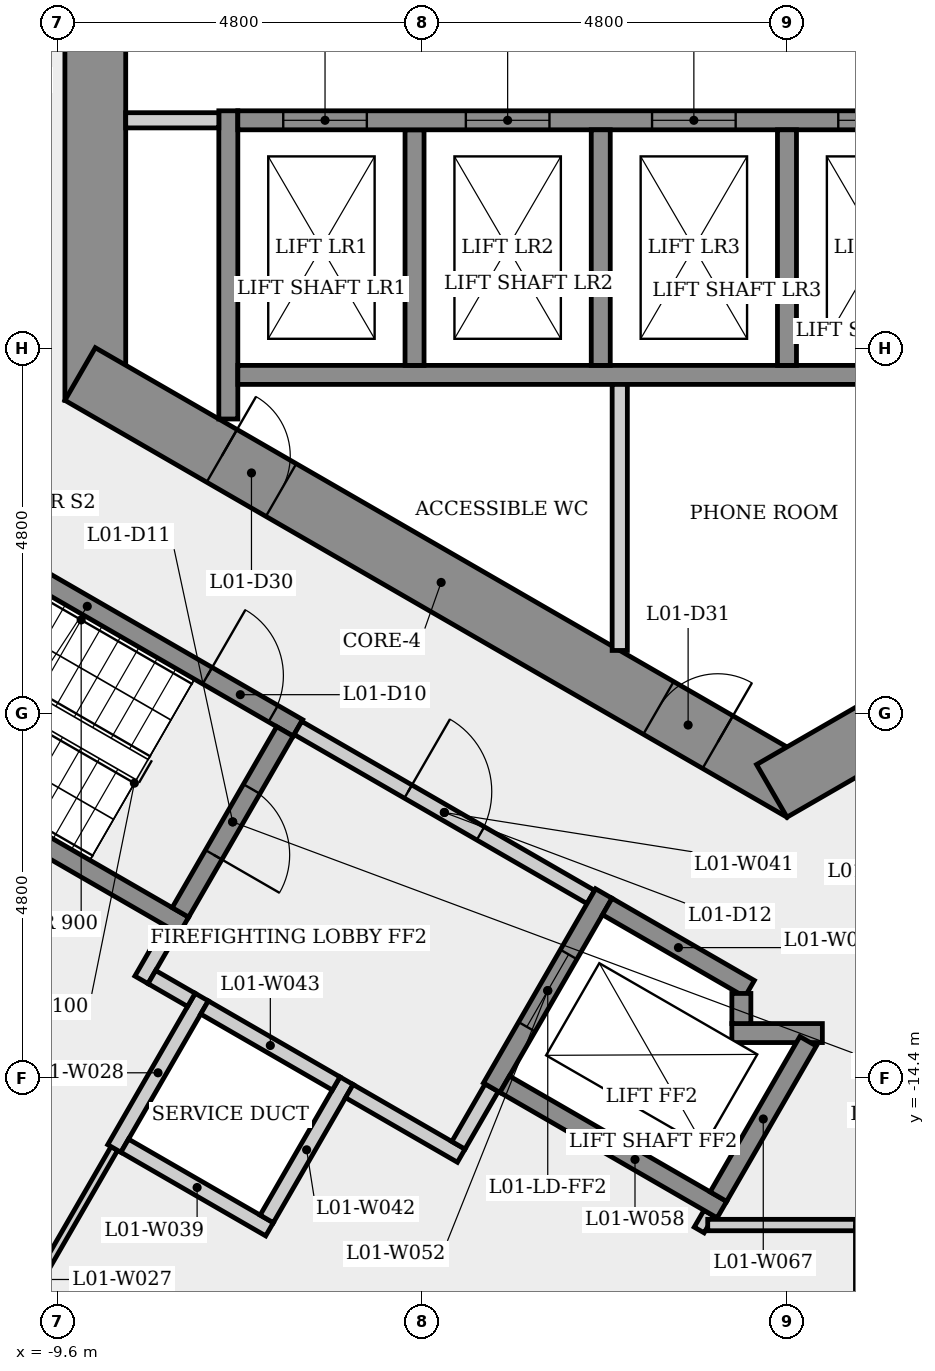
"""IFC4 building model, lengths in metres.
Left out: names, types, materials, properties, quantities, classifications, styles, units other than length and angle.
Written with IfcOpenShell. Run it as: python <this file> out.ifc"""

import sys

from ifc_helpers import new_model, si_unit, direction, frame, frame_2d, origin, place, context, subcontext, project, spatial, rectangle, extrude, element, fill, save


model = new_model("IFC4")
c1 = context("Model", 3, precision=1e-05, world=origin(), true_north=direction((0.0, 1.0)))
c2 = subcontext(c1, "Body", "Model", "MODEL_VIEW")
j1 = project(units=[si_unit("LENGTHUNIT", "METRE"), si_unit("PLANEANGLEUNIT", "RADIAN")], contexts=[c1])
p1 = place(None, origin())
s1 = spatial("IfcSite", under=j1, at=p1, CompositionType="ELEMENT")
p2 = place(p1, origin())
s2 = spatial("IfcBuilding", under=s1, at=p2, CompositionType="ELEMENT")
p3 = place(p2, frame((0.0, 0.0, 7.0)))
s3 = spatial("IfcBuildingStorey", under=s2, at=p3, CompositionType="ELEMENT", Elevation=7.0)
p4 = place(p3, frame((-9.1, 5.485, 0.0), z_axis=(0.0, 0.0, 1.0), x_axis=(0.0, -1.0, 0.0)))
e1 = element("IfcWall", 1, at=p4, inside=s3, PredefinedType="SHEAR", context=c2, shape_type="SweptSolid", body=[
    extrude(rectangle(XDim=10.97, YDim=0.8, at=frame_2d((5.485, 0.0))), origin(), (0.0, 0.0, 1.0), 4.5),
])
p5 = place(p4, frame((4.685, 0.0, 0.0)))
e2 = element("IfcOpeningElement", 2, at=p5, cuts=e1, PredefinedType="OPENING", context=c2, shape_type="SweptSolid", body=[
    extrude(rectangle(XDim=1.6, YDim=2.1, at=frame_2d((0.8, 1.05))), frame((0.0, 0.41, 0.0), z_axis=(0.0, -1.0, 0.0), x_axis=(1.0, 0.0, 0.0)), (0.0, 0.0, 1.0), 0.82),
])
p6 = place(p3, frame((-9.3, -5.138, 0.0), z_axis=(0.0, 0.0, 1.0), x_axis=(0.866023993627, -0.500002442456, 0.0)))
e3 = element("IfcWall", 3, at=p6, inside=s3, PredefinedType="SHEAR", context=c2, shape_type="SweptSolid", body=[
    extrude(rectangle(XDim=10.97, YDim=0.8, at=frame_2d((5.485, 0.0))), origin(), (0.0, 0.0, 1.0), 4.5),
])
p7 = place(p6, frame((2.153, 0.0, 0.0)))
e4 = element("IfcOpeningElement", 4, at=p7, cuts=e3, PredefinedType="OPENING", context=c2, shape_type="SweptSolid", body=[
    extrude(rectangle(XDim=0.9, YDim=2.1, at=frame_2d((0.45, 1.05))), frame((0.0, 0.41, 0.0), z_axis=(0.0, -1.0, 0.0), x_axis=(1.0, 0.0, 0.0)), (0.0, 0.0, 1.0), 0.82),
])
p8 = place(p6, frame((8.787, 0.0, 0.0)))
e5 = element("IfcOpeningElement", 5, at=p8, cuts=e3, PredefinedType="OPENING", context=c2, shape_type="SweptSolid", body=[
    extrude(rectangle(XDim=0.9, YDim=2.1, at=frame_2d((0.45, 1.05))), frame((0.0, 0.41, 0.0), z_axis=(0.0, -1.0, 0.0), x_axis=(1.0, 0.0, 0.0)), (0.0, 0.0, 1.0), 0.82),
])
p9 = place(p3, frame((-0.2, -10.623, 0.0), z_axis=(0.0, 0.0, 1.0), x_axis=(0.866023993627, 0.500002442456, 0.0)))
e6 = element("IfcWall", 6, at=p9, inside=s3, PredefinedType="SHEAR", context=c2, shape_type="SweptSolid", body=[
    extrude(rectangle(XDim=10.97, YDim=0.8, at=frame_2d((5.485, 0.0))), origin(), (0.0, 0.0, 1.0), 4.5),
])
p10 = place(p9, frame((7.57, 0.0, 0.0)))
e7 = element("IfcOpeningElement", 7, at=p10, cuts=e6, PredefinedType="OPENING", context=c2, shape_type="SweptSolid", body=[
    extrude(rectangle(XDim=0.9, YDim=2.1, at=frame_2d((0.45, 1.05))), frame((0.0, 0.41, 0.0), z_axis=(0.0, -1.0, 0.0), x_axis=(1.0, 0.0, 0.0)), (0.0, 0.0, 1.0), 0.82),
])
p11 = place(p3, frame((-11.977, -6.595, 0.0), z_axis=(0.0, 0.0, 1.0), x_axis=(0.866025499775, -0.499999833739, 0.0)))
e8 = element("IfcWall", 8, at=p11, inside=s3, PredefinedType="SHEAR", context=c2, shape_type="SweptSolid", body=[
    extrude(rectangle(XDim=6.4, YDim=0.25, at=frame_2d((3.2, 0.0))), origin(), (0.0, 0.0, 1.0), 4.1),
])
p12 = place(p11, frame((5.025, 0.0, 0.0)))
e9 = element("IfcOpeningElement", 9, at=p12, cuts=e8, PredefinedType="OPENING", context=c2, shape_type="SweptSolid", body=[
    extrude(rectangle(XDim=1.0, YDim=2.1, at=frame_2d((0.5, 1.05))), frame((0.0, 0.135, 0.0), z_axis=(0.0, -1.0, 0.0), x_axis=(1.0, 0.0, 0.0)), (0.0, 0.0, 1.0), 0.27),
])
p13 = place(p3, frame((-10.84, -18.776, 0.0), z_axis=(0.0, 0.0, 1.0), x_axis=(0.499991453095, 0.866030338286, 0.0)))
e10 = element("IfcWall", 10, at=p13, inside=s3, PredefinedType="PARTITIONING", context=c2, shape_type="SweptSolid", body=[
    extrude(rectangle(XDim=3.98, YDim=0.1, at=frame_2d((1.99, 0.0))), origin(), (0.0, 0.0, 1.0), 4.1),
])
p14 = place(p3, frame((-8.85, -15.329, 0.0), z_axis=(0.0, 0.0, 1.0), x_axis=(0.500077740698, 0.865980515519, 0.0)))
e11 = element("IfcWall", 11, at=p14, inside=s3, PredefinedType="PLUMBINGWALL", context=c2, shape_type="SweptSolid", body=[
    extrude(rectangle(XDim=2.3, YDim=0.2, at=frame_2d((1.15, 0.0))), origin(), (0.0, 0.0, 1.0), 4.1),
])
p15 = place(p3, frame((-8.493, -13.11, 0.0), z_axis=(0.0, 0.0, 1.0), x_axis=(0.500067724834, 0.865986299303, 0.0)))
e12 = element("IfcWall", 12, at=p15, inside=s3, PredefinedType="PARTITIONING", context=c2, shape_type="SweptSolid", body=[
    extrude(rectangle(XDim=0.775, YDim=0.2, at=frame_2d((0.388, 0.0))), origin(), (0.0, 0.0, 1.0), 4.1),
])
p16 = place(p3, frame((-7.935, -12.393, 0.0), z_axis=(0.0, 0.0, 1.0), x_axis=(-0.866025499775, 0.499999833739, 0.0)))
e13 = element("IfcWall", 13, at=p16, inside=s3, PredefinedType="SHEAR", context=c2, shape_type="SweptSolid", body=[
    extrude(rectangle(XDim=6.4, YDim=0.25, at=frame_2d((3.2, 0.0))), origin(), (0.0, 0.0, 1.0), 4.1),
])
p17 = place(p3, frame((-7.836, -13.373, 0.0), z_axis=(0.0, 0.0, 1.0), x_axis=(-0.866232998003, 0.499640263761, 0.0)))
e14 = element("IfcWall", 14, at=p17, inside=s3, PredefinedType="PARTITIONING", context=c2, shape_type="SweptSolid", body=[
    extrude(rectangle(XDim=0.6, YDim=0.2, at=frame_2d((0.3, 0.0))), origin(), (0.0, 0.0, 1.0), 4.1),
])
p18 = place(p3, frame((-7.35, -5.73, 0.0), z_axis=(0.0, 0.0, 1.0), x_axis=(0.0, 1.0, 0.0)))
e15 = element("IfcWall", 15, at=p18, inside=s3, PredefinedType="SHEAR", context=c2, shape_type="SweptSolid", body=[
    extrude(rectangle(XDim=4.055, YDim=0.25, at=frame_2d((2.028, 0.0))), origin(), (0.0, 0.0, 1.0), 4.1),
])
p19 = place(p3, frame((-7.475, -1.8, 0.0), z_axis=(0.0, 0.0, 1.0), x_axis=(-1.0, 0.0, 0.0)))
e16 = element("IfcWall", 16, at=p19, inside=s3, PredefinedType="PARTITIONING", context=c2, shape_type="SweptSolid", body=[
    extrude(rectangle(XDim=1.225, YDim=0.2, at=frame_2d((0.613, 0.0))), origin(), (0.0, 0.0, 1.0), 4.1),
])
p20 = place(p3, frame((-6.808, -16.392, 0.0), z_axis=(0.0, 0.0, 1.0), x_axis=(-0.866008176907, 0.50002983664, 0.0)))
e17 = element("IfcWall", 17, at=p20, inside=s3, PredefinedType="PLUMBINGWALL", context=c2, shape_type="SweptSolid", body=[
    extrude(rectangle(XDim=2.2, YDim=0.2, at=frame_2d((1.1, 0.0))), origin(), (0.0, 0.0, 1.0), 4.1),
])
p21 = place(p3, frame((-6.605, -9.841, 0.0), z_axis=(0.0, 0.0, 1.0), x_axis=(-0.499996545922, -0.866027397988, 0.0)))
e18 = element("IfcWall", 18, at=p21, inside=s3, PredefinedType="SHEAR", context=c2, shape_type="SweptSolid", body=[
    extrude(rectangle(XDim=2.75, YDim=0.25, at=frame_2d((1.375, 0.0))), origin(), (0.0, 0.0, 1.0), 4.1),
])
p22 = place(p21, frame((0.875, 0.0, 0.0)))
e19 = element("IfcOpeningElement", 19, at=p22, cuts=e18, PredefinedType="OPENING", context=c2, shape_type="SweptSolid", body=[
    extrude(rectangle(XDim=1.0, YDim=2.1, at=frame_2d((0.5, 1.05))), frame((0.0, 0.135, 0.0), z_axis=(0.0, -1.0, 0.0), x_axis=(1.0, 0.0, 0.0)), (0.0, 0.0, 1.0), 0.27),
])
p23 = place(p3, frame((-6.435, -9.795, 0.0), z_axis=(0.0, 0.0, 1.0), x_axis=(0.866012907634, -0.500021643343, 0.0)))
e20 = element("IfcWall", 20, at=p23, inside=s3, PredefinedType="PARTITIONING", context=c2, shape_type="SweptSolid", body=[
    extrude(rectangle(XDim=4.45, YDim=0.2, at=frame_2d((2.225, 0.0))), origin(), (0.0, 0.0, 1.0), 4.1),
])
p24 = place(p23, frame((1.675, 0.0, 0.0)))
e21 = element("IfcOpeningElement", 21, at=p24, cuts=e20, PredefinedType="OPENING", context=c2, shape_type="SweptSolid", body=[
    extrude(rectangle(XDim=1.1, YDim=2.1, at=frame_2d((0.55, 1.05))), frame((0.0, 0.11, 0.0), z_axis=(0.0, -1.0, 0.0), x_axis=(1.0, 0.0, 0.0)), (0.0, 0.0, 1.0), 0.22),
])
p25 = place(p3, frame((-5.795, -14.437, 0.0), z_axis=(0.0, 0.0, 1.0), x_axis=(-0.500027713859, -0.866009402589, 0.0)))
e22 = element("IfcWall", 22, at=p25, inside=s3, PredefinedType="PLUMBINGWALL", context=c2, shape_type="SweptSolid", body=[
    extrude(rectangle(XDim=2.1, YDim=0.2, at=frame_2d((1.05, 0.0))), origin(), (0.0, 0.0, 1.0), 4.1),
])
p26 = place(p3, frame((-5.931, -14.473, 0.0), z_axis=(0.0, 0.0, 1.0), x_axis=(-0.866041268327, 0.499972520799, 0.0)))
e23 = element("IfcWall", 23, at=p26, inside=s3, PredefinedType="PLUMBINGWALL", context=c2, shape_type="SweptSolid", body=[
    extrude(rectangle(XDim=2.0, YDim=0.2, at=frame_2d((1.0, 0.0))), origin(), (0.0, 0.0, 1.0), 4.1),
])
p27 = place(p3, frame((-7.225, -5.15, 0.0), z_axis=(0.0, 0.0, 1.0), x_axis=(1.0, 0.0, 0.0)))
e24 = element("IfcWall", 24, at=p27, inside=s3, PredefinedType="SHEAR", context=c2, shape_type="SweptSolid", body=[
    extrude(rectangle(XDim=14.7, YDim=0.25, at=frame_2d((7.35, 0.0))), origin(), (0.0, 0.0, 1.0), 4.1),
])
p28 = place(p3, frame((-4.9, -1.925, 0.0), z_axis=(0.0, 0.0, 1.0), x_axis=(0.0, -1.0, 0.0)))
e25 = element("IfcWall", 25, at=p28, inside=s3, PredefinedType="SHEAR", context=c2, shape_type="SweptSolid", body=[
    extrude(rectangle(XDim=3.1, YDim=0.25, at=frame_2d((1.55, 0.0))), origin(), (0.0, 0.0, 1.0), 4.5),
])
p29 = place(p3, frame((-7.225, -1.8, 0.0), z_axis=(0.0, 0.0, 1.0), x_axis=(1.0, 0.0, 0.0)))
e26 = element("IfcWall", 26, at=p29, inside=s3, PredefinedType="SHEAR", context=c2, shape_type="SweptSolid", body=[
    extrude(rectangle(XDim=14.7, YDim=0.25, at=frame_2d((7.35, 0.0))), origin(), (0.0, 0.0, 1.0), 4.1),
])
p30 = place(p29, frame((0.597, 0.0, 0.0)))
e27 = element("IfcOpeningElement", 27, at=p30, cuts=e26, PredefinedType="OPENING", context=c2, shape_type="SweptSolid", body=[
    extrude(rectangle(XDim=1.1, YDim=2.1, at=frame_2d((0.55, 1.05))), frame((0.0, 0.135, 0.0), z_axis=(0.0, -1.0, 0.0), x_axis=(1.0, 0.0, 0.0)), (0.0, 0.0, 1.0), 0.27),
])
p31 = place(p29, frame((3.0, 0.0, 0.0)))
e28 = element("IfcOpeningElement", 28, at=p31, cuts=e26, PredefinedType="OPENING", context=c2, shape_type="SweptSolid", body=[
    extrude(rectangle(XDim=1.1, YDim=2.1, at=frame_2d((0.55, 1.05))), frame((0.0, 0.135, 0.0), z_axis=(0.0, -1.0, 0.0), x_axis=(1.0, 0.0, 0.0)), (0.0, 0.0, 1.0), 0.27),
])
p32 = place(p29, frame((5.45, 0.0, 0.0)))
e29 = element("IfcOpeningElement", 29, at=p32, cuts=e26, PredefinedType="OPENING", context=c2, shape_type="SweptSolid", body=[
    extrude(rectangle(XDim=1.1, YDim=2.1, at=frame_2d((0.55, 1.05))), frame((0.0, 0.135, 0.0), z_axis=(0.0, -1.0, 0.0), x_axis=(1.0, 0.0, 0.0)), (0.0, 0.0, 1.0), 0.27),
])
p33 = place(p29, frame((7.9, 0.0, 0.0)))
e30 = element("IfcOpeningElement", 30, at=p33, cuts=e26, PredefinedType="OPENING", context=c2, shape_type="SweptSolid", body=[
    extrude(rectangle(XDim=1.1, YDim=2.1, at=frame_2d((0.55, 1.05))), frame((0.0, 0.135, 0.0), z_axis=(0.0, -1.0, 0.0), x_axis=(1.0, 0.0, 0.0)), (0.0, 0.0, 1.0), 0.27),
])
p34 = place(p29, frame((10.35, 0.0, 0.0)))
e31 = element("IfcOpeningElement", 31, at=p34, cuts=e26, PredefinedType="OPENING", context=c2, shape_type="SweptSolid", body=[
    extrude(rectangle(XDim=1.1, YDim=2.1, at=frame_2d((0.55, 1.05))), frame((0.0, 0.135, 0.0), z_axis=(0.0, -1.0, 0.0), x_axis=(1.0, 0.0, 0.0)), (0.0, 0.0, 1.0), 0.27),
])
p35 = place(p3, frame((-4.286, -15.423, 0.0), z_axis=(0.0, 0.0, 1.0), x_axis=(-0.866025371046, 0.500000056704, 0.0)))
e32 = element("IfcWall", 32, at=p35, inside=s3, PredefinedType="PARTITIONING", context=c2, shape_type="SweptSolid", body=[
    extrude(rectangle(XDim=1.7, YDim=0.2, at=frame_2d((0.85, 0.0))), origin(), (0.0, 0.0, 1.0), 4.1),
])
p36 = place(p3, frame((-3.885, -14.529, 0.0), z_axis=(0.0, 0.0, 1.0), x_axis=(-0.499859285417, -0.866106630146, 0.0)))
e33 = element("IfcWall", 33, at=p36, inside=s3, PredefinedType="PARTITIONING", context=c2, shape_type="SweptSolid", body=[
    extrude(rectangle(XDim=0.875, YDim=0.2, at=frame_2d((0.438, 0.0))), origin(), (0.0, 0.0, 1.0), 4.1),
])
p37 = place(p3, frame((-2.41, -11.974, 0.0), z_axis=(0.0, 0.0, 1.0), x_axis=(-0.500001826776, -0.866024349092, 0.0)))
e34 = element("IfcWall", 34, at=p37, inside=s3, PredefinedType="SHEAR", context=c2, shape_type="SweptSolid", body=[
    extrude(rectangle(XDim=2.95, YDim=0.25, at=frame_2d((1.475, 0.0))), origin(), (0.0, 0.0, 1.0), 4.1),
])
p38 = place(p37, frame((0.925, 0.0, 0.0)))
e35 = element("IfcOpeningElement", 35, at=p38, cuts=e34, PredefinedType="OPENING", context=c2, shape_type="SweptSolid", body=[
    extrude(rectangle(XDim=1.1, YDim=2.1, at=frame_2d((0.55, 1.05))), frame((0.0, 0.135, 0.0), z_axis=(0.0, -1.0, 0.0), x_axis=(1.0, 0.0, 0.0)), (0.0, 0.0, 1.0), 0.27),
])
p39 = place(p3, frame((-2.364, -12.145, 0.0), z_axis=(0.0, 0.0, 1.0), x_axis=(0.86603892542, -0.499976579108, 0.0)))
e36 = element("IfcWall", 36, at=p39, inside=s3, PredefinedType="SHEAR", context=c2, shape_type="SweptSolid", body=[
    extrude(rectangle(XDim=2.162, YDim=0.25, at=frame_2d((1.081, 0.0))), origin(), (0.0, 0.0, 1.0), 4.1),
])
p40 = place(p3, frame((-2.45, -1.925, 0.0), z_axis=(0.0, 0.0, 1.0), x_axis=(0.0, -1.0, 0.0)))
e37 = element("IfcWall", 37, at=p40, inside=s3, PredefinedType="SHEAR", context=c2, shape_type="SweptSolid", body=[
    extrude(rectangle(XDim=3.1, YDim=0.25, at=frame_2d((1.55, 0.0))), origin(), (0.0, 0.0, 1.0), 4.5),
])
p41 = place(p3, frame((-2.2, -5.275, 0.0), z_axis=(0.0, 0.0, 1.0), x_axis=(0.0, -1.0, 0.0)))
e38 = element("IfcWall", 38, at=p41, inside=s3, PredefinedType="PARTITIONING", context=c2, shape_type="SweptSolid", body=[
    extrude(rectangle(XDim=3.501, YDim=0.2, at=frame_2d((1.75, 0.0))), origin(), (0.0, 0.0, 1.0), 4.1),
])
p42 = place(p3, frame((-1.155, -16.401, 0.0), z_axis=(0.0, 0.0, 1.0), x_axis=(0.500134748329, 0.865947592822, 0.0)))
e39 = element("IfcWall", 39, at=p42, inside=s3, PredefinedType="PARTITIONING", context=c2, shape_type="SweptSolid", body=[
    extrude(rectangle(XDim=0.256, YDim=0.15, at=frame_2d((0.128, 0.0))), origin(), (0.0, 0.0, 1.0), 4.1),
])
p43 = place(p3, frame((-0.856, -16.133, 0.0), z_axis=(0.0, 0.0, 1.0), x_axis=(-0.866021716278, 0.500006386895, 0.0)))
e40 = element("IfcWall", 40, at=p43, inside=s3, PredefinedType="SHEAR", context=c2, shape_type="SweptSolid", body=[
    extrude(rectangle(XDim=3.3, YDim=0.25, at=frame_2d((1.65, 0.0))), origin(), (0.0, 0.0, 1.0), 4.1),
])
p44 = place(p3, frame((-0.725, -13.81, 0.0), z_axis=(0.0, 0.0, 1.0), x_axis=(1.0, 0.0, 0.0)))
e41 = element("IfcWall", 41, at=p44, inside=s3, PredefinedType="SHEAR", context=c2, shape_type="SweptSolid", body=[
    extrude(rectangle(XDim=1.191, YDim=0.25, at=frame_2d((0.595, 0.0))), origin(), (0.0, 0.0, 1.0), 4.1),
])
p45 = place(p3, frame((-0.6, -13.289, 0.0), z_axis=(0.0, 0.0, 1.0), x_axis=(0.0, -1.0, 0.0)))
e42 = element("IfcWall", 42, at=p45, inside=s3, PredefinedType="SHEAR", context=c2, shape_type="SweptSolid", body=[
    extrude(rectangle(XDim=0.396, YDim=0.25, at=frame_2d((0.198, 0.0))), origin(), (0.0, 0.0, 1.0), 4.5),
])
p46 = place(p3, frame((0.0, -1.925, 0.0), z_axis=(0.0, 0.0, 1.0), x_axis=(0.0, -1.0, 0.0)))
e43 = element("IfcWall", 43, at=p46, inside=s3, PredefinedType="SHEAR", context=c2, shape_type="SweptSolid", body=[
    extrude(rectangle(XDim=3.1, YDim=0.25, at=frame_2d((1.55, 0.0))), origin(), (0.0, 0.0, 1.0), 4.5),
])
p47 = place(p3, frame((0.278, -13.918, 0.0), z_axis=(0.0, 0.0, 1.0), x_axis=(-0.49998806882, -0.866032292145, 0.0)))
e44 = element("IfcWall", 44, at=p47, inside=s3, PredefinedType="SHEAR", context=c2, shape_type="SweptSolid", body=[
    extrude(rectangle(XDim=2.36, YDim=0.25, at=frame_2d((1.18, 0.0))), origin(), (0.0, 0.0, 1.0), 4.5),
])
p48 = place(p3, frame((3.814, -16.336, 0.0), z_axis=(0.0, 0.0, 1.0), x_axis=(-1.0, 0.0, 0.0)))
e45 = element("IfcWall", 45, at=p48, inside=s3, PredefinedType="PARTITIONING", context=c2, shape_type="SweptSolid", body=[
    extrude(rectangle(XDim=4.857, YDim=0.15, at=frame_2d((2.428, 0.0))), origin(), (0.0, 0.0, 1.0), 4.1),
])
p49 = place(p48, frame((1.928, 0.0, 0.0)))
e46 = element("IfcOpeningElement", 46, at=p49, cuts=e45, PredefinedType="OPENING", context=c2, shape_type="SweptSolid", body=[
    extrude(rectangle(XDim=1.0, YDim=2.1, at=frame_2d((0.5, 1.05))), frame((0.0, 0.085, 0.0), z_axis=(0.0, -1.0, 0.0), x_axis=(1.0, 0.0, 0.0)), (0.0, 0.0, 1.0), 0.17),
])
p50 = place(p30, origin())
e47 = element("IfcDoor", 47, at=p50, inside=s3, OperationType="SLIDING_TO_LEFT", PredefinedType="DOOR", context=c2, shape_type="SweptSolid", body=[
    extrude(rectangle(XDim=1.1, YDim=2.1, at=frame_2d((0.55, 1.05))), frame((0.0, 0.025, 0.0), z_axis=(0.0, -1.0, 0.0), x_axis=(1.0, 0.0, 0.0)), (0.0, 0.0, 1.0), 0.05),
])
fill(e27, e47)
p51 = place(p31, origin())
e48 = element("IfcDoor", 48, at=p51, inside=s3, OperationType="SLIDING_TO_LEFT", PredefinedType="DOOR", context=c2, shape_type="SweptSolid", body=[
    extrude(rectangle(XDim=1.1, YDim=2.1, at=frame_2d((0.55, 1.05))), frame((0.0, 0.025, 0.0), z_axis=(0.0, -1.0, 0.0), x_axis=(1.0, 0.0, 0.0)), (0.0, 0.0, 1.0), 0.05),
])
fill(e28, e48)
p52 = place(p32, origin())
e49 = element("IfcDoor", 49, at=p52, inside=s3, OperationType="SLIDING_TO_LEFT", PredefinedType="DOOR", context=c2, shape_type="SweptSolid", body=[
    extrude(rectangle(XDim=1.1, YDim=2.1, at=frame_2d((0.55, 1.05))), frame((0.0, 0.025, 0.0), z_axis=(0.0, -1.0, 0.0), x_axis=(1.0, 0.0, 0.0)), (0.0, 0.0, 1.0), 0.05),
])
fill(e29, e49)
p53 = place(p33, origin())
e50 = element("IfcDoor", 50, at=p53, inside=s3, OperationType="SLIDING_TO_LEFT", PredefinedType="DOOR", context=c2, shape_type="SweptSolid", body=[
    extrude(rectangle(XDim=1.1, YDim=2.1, at=frame_2d((0.55, 1.05))), frame((0.0, 0.025, 0.0), z_axis=(0.0, -1.0, 0.0), x_axis=(1.0, 0.0, 0.0)), (0.0, 0.0, 1.0), 0.05),
])
fill(e30, e50)
p54 = place(p12, origin())
e51 = element("IfcDoor", 51, at=p54, inside=s3, OperationType="SINGLE_SWING_LEFT", PredefinedType="DOOR", context=c2, shape_type="SweptSolid", body=[
    extrude(rectangle(XDim=1.0, YDim=2.1, at=frame_2d((0.5, 1.05))), frame((0.0, 0.025, 0.0), z_axis=(0.0, -1.0, 0.0), x_axis=(1.0, 0.0, 0.0)), (0.0, 0.0, 1.0), 0.05),
])
fill(e9, e51)
p55 = place(p22, origin())
e52 = element("IfcDoor", 52, at=p55, inside=s3, OperationType="SINGLE_SWING_RIGHT", PredefinedType="DOOR", context=c2, shape_type="SweptSolid", body=[
    extrude(rectangle(XDim=1.0, YDim=2.1, at=frame_2d((0.5, 1.05))), frame((0.0, 0.025, 0.0), z_axis=(0.0, -1.0, 0.0), x_axis=(1.0, 0.0, 0.0)), (0.0, 0.0, 1.0), 0.05),
])
fill(e19, e52)
p56 = place(p24, origin())
e53 = element("IfcDoor", 53, at=p56, inside=s3, OperationType="SINGLE_SWING_LEFT", PredefinedType="DOOR", context=c2, shape_type="SweptSolid", body=[
    extrude(rectangle(XDim=1.1, YDim=2.1, at=frame_2d((0.55, 1.05))), frame((0.0, 0.025, 0.0), z_axis=(0.0, -1.0, 0.0), x_axis=(1.0, 0.0, 0.0)), (0.0, 0.0, 1.0), 0.05),
])
fill(e21, e53)
p57 = place(p38, origin())
e54 = element("IfcDoor", 54, at=p57, inside=s3, OperationType="SLIDING_TO_LEFT", PredefinedType="DOOR", context=c2, shape_type="SweptSolid", body=[
    extrude(rectangle(XDim=1.1, YDim=2.1, at=frame_2d((0.55, 1.05))), frame((0.0, 0.025, 0.0), z_axis=(0.0, -1.0, 0.0), x_axis=(1.0, 0.0, 0.0)), (0.0, 0.0, 1.0), 0.05),
])
fill(e35, e54)
p58 = place(p49, origin())
e55 = element("IfcDoor", 55, at=p58, inside=s3, OperationType="SINGLE_SWING_RIGHT", PredefinedType="DOOR", context=c2, shape_type="SweptSolid", body=[
    extrude(rectangle(XDim=1.0, YDim=2.1, at=frame_2d((0.5, 1.05))), frame((0.0, 0.025, 0.0), z_axis=(0.0, -1.0, 0.0), x_axis=(1.0, 0.0, 0.0)), (0.0, 0.0, 1.0), 0.05),
])
fill(e46, e55)
p59 = place(p7, origin())
e56 = element("IfcDoor", 56, at=p59, inside=s3, OperationType="SINGLE_SWING_LEFT", PredefinedType="DOOR", context=c2, shape_type="SweptSolid", body=[
    extrude(rectangle(XDim=0.9, YDim=2.1, at=frame_2d((0.45, 1.05))), frame((0.0, 0.025, 0.0), z_axis=(0.0, -1.0, 0.0), x_axis=(1.0, 0.0, 0.0)), (0.0, 0.0, 1.0), 0.05),
])
fill(e4, e56)
p60 = place(p8, origin())
e57 = element("IfcDoor", 57, at=p60, inside=s3, OperationType="SINGLE_SWING_RIGHT", PredefinedType="DOOR", context=c2, shape_type="SweptSolid", body=[
    extrude(rectangle(XDim=0.9, YDim=2.1, at=frame_2d((0.45, 1.05))), frame((0.0, 0.025, 0.0), z_axis=(0.0, -1.0, 0.0), x_axis=(1.0, 0.0, 0.0)), (0.0, 0.0, 1.0), 0.05),
])
fill(e5, e57)
save(model, sys.argv[1])
